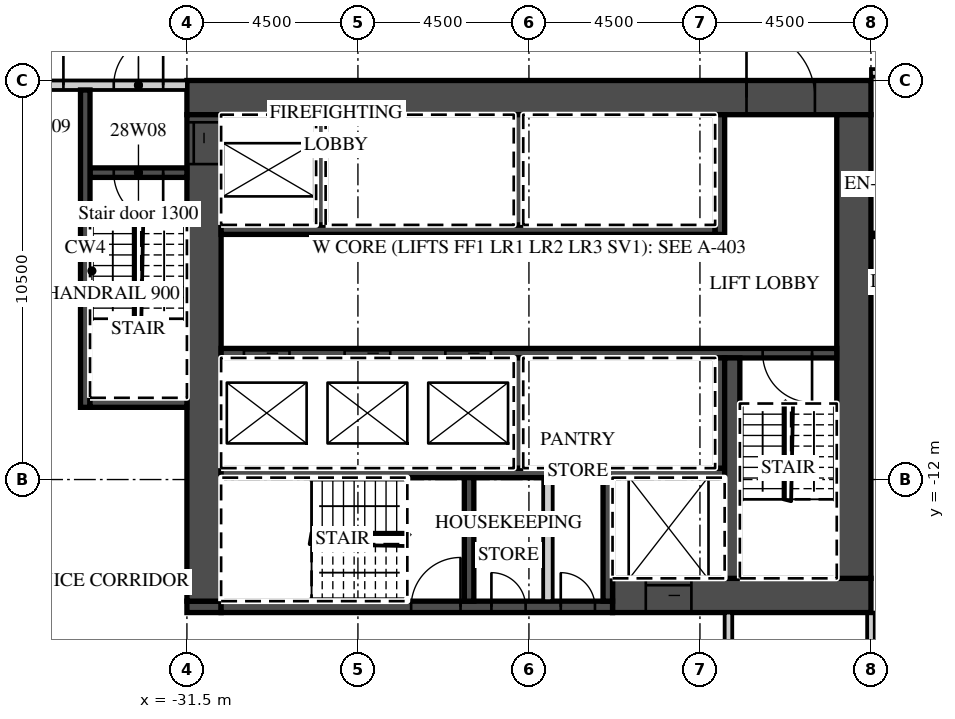
"""IFC4 building model, lengths in metres.
Left out: names, types, materials, properties, quantities, classifications, styles, units other than length and angle.
Written with IfcOpenShell. Run it as: python <this file> out.ifc"""

import sys

from ifc_helpers import new_model, si_unit, direction, frame, frame_2d, origin, place, context, subcontext, project, spatial, rectangle, extrude, element, fill, save


model = new_model("IFC4")
c1 = context("Model", 3, precision=1e-05, world=origin(), true_north=direction((0.0, 1.0)))
c2 = subcontext(c1, "Body", "Model", "MODEL_VIEW")
j1 = project(units=[si_unit("LENGTHUNIT", "METRE"), si_unit("PLANEANGLEUNIT", "RADIAN")], contexts=[c1])
p1 = place(None, origin())
s1 = spatial("IfcSite", under=j1, at=p1, CompositionType="ELEMENT")
p2 = place(p1, origin())
s2 = spatial("IfcBuilding", under=s1, at=p2, CompositionType="ELEMENT")
p3 = place(p2, frame((0.0, 0.0, 127.3)))
s3 = spatial("IfcBuildingStorey", under=s2, at=p3, CompositionType="ELEMENT", Elevation=127.3)
p4 = place(p3, frame((-13.5, -22.232, 0.0), z_axis=(0.0, 0.0, 1.0), x_axis=(0.0, 1.0, 0.0)))
e1 = element("IfcWall", 1, at=p4, inside=s3, PredefinedType="PARTITIONING", context=c2, shape_type="SweptSolid", body=[
    extrude(rectangle(XDim=6.732, YDim=0.2, at=frame_2d((3.366, 0.0))), origin(), (0.0, 0.0, 1.0), 3.02),
])
p5 = place(p3, frame((-13.5, -1.3, 0.0), z_axis=(0.0, 0.0, 1.0), x_axis=(1.0, 0.0, 0.0)))
e2 = element("IfcWall", 2, at=p5, inside=s3, PredefinedType="PARTITIONING", context=c2, shape_type="SweptSolid", body=[
    extrude(rectangle(XDim=60.932, YDim=0.2, at=frame_2d((30.466, 0.0))), origin(), (0.0, 0.0, 1.0), 3.02),
])
p6 = place(p5, frame((2.925, 0.0, 0.0)))
e3 = element("IfcOpeningElement", 3, at=p6, cuts=e2, PredefinedType="OPENING", context=c2, shape_type="SweptSolid", body=[
    extrude(rectangle(XDim=1.0, YDim=2.1, at=frame_2d((0.5, 1.05))), frame((0.0, 0.11, 0.0), z_axis=(0.0, -1.0, 0.0), x_axis=(1.0, 0.0, 0.0)), (0.0, 0.0, 1.0), 0.22),
])
p7 = place(p5, frame((9.863, 0.0, 0.0)))
e4 = element("IfcOpeningElement", 4, at=p7, cuts=e2, PredefinedType="OPENING", context=c2, shape_type="SweptSolid", body=[
    extrude(rectangle(XDim=1.2, YDim=2.1, at=frame_2d((0.6, 1.05))), frame((0.0, 0.11, 0.0), z_axis=(0.0, -1.0, 0.0), x_axis=(1.0, 0.0, 0.0)), (0.0, 0.0, 1.0), 0.22),
])
p8 = place(p5, frame((15.938, 0.0, 0.0)))
e5 = element("IfcOpeningElement", 5, at=p8, cuts=e2, PredefinedType="OPENING", context=c2, shape_type="SweptSolid", body=[
    extrude(rectangle(XDim=1.2, YDim=2.1, at=frame_2d((0.6, 1.05))), frame((0.0, 0.11, 0.0), z_axis=(0.0, -1.0, 0.0), x_axis=(1.0, 0.0, 0.0)), (0.0, 0.0, 1.0), 0.22),
])
p9 = place(p5, frame((27.862, 0.0, 0.0)))
e6 = element("IfcOpeningElement", 6, at=p9, cuts=e2, PredefinedType="OPENING", context=c2, shape_type="SweptSolid", body=[
    extrude(rectangle(XDim=1.2, YDim=2.1, at=frame_2d((0.6, 1.05))), frame((0.0, 0.11, 0.0), z_axis=(0.0, -1.0, 0.0), x_axis=(1.0, 0.0, 0.0)), (0.0, 0.0, 1.0), 0.22),
])
p10 = place(p5, frame((34.45, 0.0, 0.0)))
e7 = element("IfcOpeningElement", 7, at=p10, cuts=e2, PredefinedType="OPENING", context=c2, shape_type="SweptSolid", body=[
    extrude(rectangle(XDim=1.0, YDim=2.1, at=frame_2d((0.5, 1.05))), frame((0.0, 0.11, 0.0), z_axis=(0.0, -1.0, 0.0), x_axis=(1.0, 0.0, 0.0)), (0.0, 0.0, 1.0), 0.22),
])
p11 = place(p5, frame((36.55, 0.0, 0.0)))
e8 = element("IfcOpeningElement", 8, at=p11, cuts=e2, PredefinedType="OPENING", context=c2, shape_type="SweptSolid", body=[
    extrude(rectangle(XDim=1.0, YDim=2.1, at=frame_2d((0.5, 1.05))), frame((0.0, 0.11, 0.0), z_axis=(0.0, -1.0, 0.0), x_axis=(1.0, 0.0, 0.0)), (0.0, 0.0, 1.0), 0.22),
])
p12 = place(p5, frame((41.075, 0.0, 0.0)))
e9 = element("IfcOpeningElement", 9, at=p12, cuts=e2, PredefinedType="OPENING", context=c2, shape_type="SweptSolid", body=[
    extrude(rectangle(XDim=1.0, YDim=2.1, at=frame_2d((0.5, 1.05))), frame((0.0, 0.11, 0.0), z_axis=(0.0, -1.0, 0.0), x_axis=(1.0, 0.0, 0.0)), (0.0, 0.0, 1.0), 0.22),
])
p13 = place(p5, frame((45.55, 0.0, 0.0)))
e10 = element("IfcOpeningElement", 10, at=p13, cuts=e2, PredefinedType="OPENING", context=c2, shape_type="SweptSolid", body=[
    extrude(rectangle(XDim=1.0, YDim=2.1, at=frame_2d((0.5, 1.05))), frame((0.0, 0.11, 0.0), z_axis=(0.0, -1.0, 0.0), x_axis=(1.0, 0.0, 0.0)), (0.0, 0.0, 1.0), 0.22),
])
p14 = place(p5, frame((50.075, 0.0, 0.0)))
e11 = element("IfcOpeningElement", 11, at=p14, cuts=e2, PredefinedType="OPENING", context=c2, shape_type="SweptSolid", body=[
    extrude(rectangle(XDim=1.0, YDim=2.1, at=frame_2d((0.5, 1.05))), frame((0.0, 0.11, 0.0), z_axis=(0.0, -1.0, 0.0), x_axis=(1.0, 0.0, 0.0)), (0.0, 0.0, 1.0), 0.22),
])
p15 = place(p5, frame((54.575, 0.0, 0.0)))
e12 = element("IfcOpeningElement", 12, at=p15, cuts=e2, PredefinedType="OPENING", context=c2, shape_type="SweptSolid", body=[
    extrude(rectangle(XDim=1.0, YDim=2.1, at=frame_2d((0.5, 1.05))), frame((0.0, 0.11, 0.0), z_axis=(0.0, -1.0, 0.0), x_axis=(1.0, 0.0, 0.0)), (0.0, 0.0, 1.0), 0.22),
])
p16 = place(p5, frame((59.882, 0.0, 0.0)))
e13 = element("IfcOpeningElement", 13, at=p16, cuts=e2, PredefinedType="OPENING", context=c2, shape_type="SweptSolid", body=[
    extrude(rectangle(XDim=0.9, YDim=2.1, at=frame_2d((0.45, 1.05))), frame((0.0, 0.11, 0.0), z_axis=(0.0, -1.0, 0.0), x_axis=(1.0, 0.0, 0.0)), (0.0, 0.0, 1.0), 0.22),
])
p17 = place(p3, frame((-31.5, -1.95, 0.0), z_axis=(0.0, 0.0, 1.0), x_axis=(1.0, 0.0, 0.0)))
e14 = element("IfcWall", 14, at=p17, inside=s3, PredefinedType="SHEAR", context=c2, shape_type="SweptSolid", body=[
    extrude(rectangle(XDim=18.0, YDim=0.9, at=frame_2d((9.0, 0.0))), origin(), (0.0, 0.0, 1.0), 3.02),
])
p18 = place(p17, frame((14.725, 0.0, 0.0)))
e15 = element("IfcOpeningElement", 15, at=p18, cuts=e14, PredefinedType="OPENING", context=c2, shape_type="SweptSolid", body=[
    extrude(rectangle(XDim=1.8, YDim=2.1, at=frame_2d((0.9, 1.05))), frame((0.0, 0.46, 0.0), z_axis=(0.0, -1.0, 0.0), x_axis=(1.0, 0.0, 0.0)), (0.0, 0.0, 1.0), 0.92),
])
p19 = place(p3, frame((-20.3, -15.05, 0.0), z_axis=(0.0, 0.0, 1.0), x_axis=(1.0, 0.0, 0.0)))
e16 = element("IfcWall", 16, at=p19, inside=s3, PredefinedType="SHEAR", context=c2, shape_type="SweptSolid", body=[
    extrude(rectangle(XDim=6.8, YDim=0.9, at=frame_2d((3.4, 0.0))), origin(), (0.0, 0.0, 1.0), 3.02),
])
p20 = place(p19, frame((0.875, 0.0, 0.0)))
e17 = element("IfcOpeningElement", 17, at=p20, cuts=e16, PredefinedType="OPENING", context=c2, shape_type="SweptSolid", body=[
    extrude(rectangle(XDim=1.2, YDim=2.1, at=frame_2d((0.6, 1.05))), frame((0.0, 0.46, 0.0), z_axis=(0.0, -1.0, 0.0), x_axis=(1.0, 0.0, 0.0)), (0.0, 0.0, 1.0), 0.92),
])
p21 = place(p3, frame((-31.5, -15.35, 0.0), z_axis=(0.0, 0.0, 1.0), x_axis=(1.0, 0.0, 0.0)))
e18 = element("IfcWall", 18, at=p21, inside=s3, PredefinedType="SHEAR", context=c2, shape_type="SweptSolid", body=[
    extrude(rectangle(XDim=0.9, YDim=0.3, at=frame_2d((0.45, 0.0))), origin(), (0.0, 0.0, 1.0), 3.02),
])
p22 = place(p3, frame((-30.6, -15.35, 0.0), z_axis=(0.0, 0.0, 1.0), x_axis=(1.0, 0.0, 0.0)))
e19 = element("IfcWall", 19, at=p22, inside=s3, PredefinedType="SHEAR", context=c2, shape_type="SweptSolid", body=[
    extrude(rectangle(XDim=10.3, YDim=0.3, at=frame_2d((5.15, 0.0))), origin(), (0.0, 0.0, 1.0), 3.02),
])
p23 = place(p22, frame((5.0, 0.0, 0.0)))
e20 = element("IfcOpeningElement", 20, at=p23, cuts=e19, PredefinedType="OPENING", context=c2, shape_type="SweptSolid", body=[
    extrude(rectangle(XDim=1.3, YDim=2.1, at=frame_2d((0.65, 1.05))), frame((0.0, 0.16, 0.0), z_axis=(0.0, -1.0, 0.0), x_axis=(1.0, 0.0, 0.0)), (0.0, 0.0, 1.0), 0.32),
])
p24 = place(p22, frame((7.113, 0.0, 0.0)))
e21 = element("IfcOpeningElement", 21, at=p24, cuts=e19, PredefinedType="OPENING", context=c2, shape_type="SweptSolid", body=[
    extrude(rectangle(XDim=0.9, YDim=2.1, at=frame_2d((0.45, 1.05))), frame((0.0, 0.16, 0.0), z_axis=(0.0, -1.0, 0.0), x_axis=(1.0, 0.0, 0.0)), (0.0, 0.0, 1.0), 0.32),
])
p25 = place(p22, frame((8.938, 0.0, 0.0)))
e22 = element("IfcOpeningElement", 22, at=p25, cuts=e19, PredefinedType="OPENING", context=c2, shape_type="SweptSolid", body=[
    extrude(rectangle(XDim=0.9, YDim=2.1, at=frame_2d((0.45, 1.05))), frame((0.0, 0.16, 0.0), z_axis=(0.0, -1.0, 0.0), x_axis=(1.0, 0.0, 0.0)), (0.0, 0.0, 1.0), 0.32),
])
p26 = place(p3, frame((-31.05, -15.2, 0.0), z_axis=(0.0, 0.0, 1.0), x_axis=(0.0, 1.0, 0.0)))
e23 = element("IfcWall", 23, at=p26, inside=s3, PredefinedType="SHEAR", context=c2, shape_type="SweptSolid", body=[
    extrude(rectangle(XDim=12.8, YDim=0.9, at=frame_2d((6.4, 0.0))), origin(), (0.0, 0.0, 1.0), 3.02),
])
p27 = place(p26, frame((11.5, 0.0, 0.0)))
e24 = element("IfcOpeningElement", 24, at=p27, cuts=e23, PredefinedType="OPENING", context=c2, shape_type="SweptSolid", body=[
    extrude(rectangle(XDim=1.1, YDim=2.1, at=frame_2d((0.55, 1.05))), frame((0.0, 0.46, 0.0), z_axis=(0.0, -1.0, 0.0), x_axis=(1.0, 0.0, 0.0)), (0.0, 0.0, 1.0), 0.92),
])
p28 = place(p3, frame((-13.95, -14.6, 0.0), z_axis=(0.0, 0.0, 1.0), x_axis=(0.0, 1.0, 0.0)))
e25 = element("IfcWall", 25, at=p28, inside=s3, PredefinedType="SHEAR", context=c2, shape_type="SweptSolid", body=[
    extrude(rectangle(XDim=12.2, YDim=0.9, at=frame_2d((6.1, 0.0))), origin(), (0.0, 0.0, 1.0), 3.02),
])
p29 = place(p3, frame((-30.6, -5.425, 0.0), z_axis=(0.0, 0.0, 1.0), x_axis=(1.0, 0.0, 0.0)))
e26 = element("IfcWall", 26, at=p29, inside=s3, PredefinedType="SHEAR", context=c2, shape_type="SweptSolid", body=[
    extrude(rectangle(XDim=13.0, YDim=0.25, at=frame_2d((6.5, 0.0))), origin(), (0.0, 0.0, 1.0), 3.02),
])
p30 = place(p3, frame((-17.475, -5.55, 0.0), z_axis=(0.0, 0.0, 1.0), x_axis=(0.0, 1.0, 0.0)))
e27 = element("IfcWall", 27, at=p30, inside=s3, PredefinedType="SHEAR", context=c2, shape_type="SweptSolid", body=[
    extrude(rectangle(XDim=3.15, YDim=0.25, at=frame_2d((1.575, 0.0))), origin(), (0.0, 0.0, 1.0), 3.02),
])
for number, where, z_axis, x_axis in (
    (28, (-27.975, -5.3, 0.0), (0.0, 0.0, 1.0), (0.0, 1.0, 0.0)),
    (29, (-22.775, -5.3, 0.0), (0.0, 0.0, 1.0), (0.0, 1.0, 0.0)),
):
    element("IfcWall", number, at=place(p3, frame(where, z_axis=z_axis, x_axis=x_axis)), inside=s3, PredefinedType="SHEAR", context=c2, shape_type="SweptSolid", body=[
        extrude(rectangle(XDim=2.9, YDim=0.25, at=frame_2d((1.45, 0.0))), origin(), (0.0, 0.0, 1.0), 3.02),
    ])
p31 = place(p3, frame((-30.6, -8.675, 0.0), z_axis=(0.0, 0.0, 1.0), x_axis=(1.0, 0.0, 0.0)))
e30 = element("IfcWall", 30, at=p31, inside=s3, PredefinedType="SHEAR", context=c2, shape_type="SweptSolid", body=[
    extrude(rectangle(XDim=16.2, YDim=0.25, at=frame_2d((8.1, 0.0))), origin(), (0.0, 0.0, 1.0), 3.02),
])
p32 = place(p31, frame((0.6, 0.0, 0.0)))
e31 = element("IfcOpeningElement", 31, at=p32, cuts=e30, PredefinedType="OPENING", context=c2, shape_type="SweptSolid", body=[
    extrude(rectangle(XDim=1.2, YDim=2.1, at=frame_2d((0.6, 1.05))), frame((0.0, 0.135, 0.0), z_axis=(0.0, -1.0, 0.0), x_axis=(1.0, 0.0, 0.0)), (0.0, 0.0, 1.0), 0.27),
])
p33 = place(p31, frame((3.25, 0.0, 0.0)))
e32 = element("IfcOpeningElement", 32, at=p33, cuts=e30, PredefinedType="OPENING", context=c2, shape_type="SweptSolid", body=[
    extrude(rectangle(XDim=1.2, YDim=2.1, at=frame_2d((0.6, 1.05))), frame((0.0, 0.135, 0.0), z_axis=(0.0, -1.0, 0.0), x_axis=(1.0, 0.0, 0.0)), (0.0, 0.0, 1.0), 0.27),
])
p34 = place(p31, frame((5.9, 0.0, 0.0)))
e33 = element("IfcOpeningElement", 33, at=p34, cuts=e30, PredefinedType="OPENING", context=c2, shape_type="SweptSolid", body=[
    extrude(rectangle(XDim=1.2, YDim=2.1, at=frame_2d((0.6, 1.05))), frame((0.0, 0.135, 0.0), z_axis=(0.0, -1.0, 0.0), x_axis=(1.0, 0.0, 0.0)), (0.0, 0.0, 1.0), 0.27),
])
p35 = place(p31, frame((14.25, 0.0, 0.0)))
e34 = element("IfcOpeningElement", 34, at=p35, cuts=e30, PredefinedType="OPENING", context=c2, shape_type="SweptSolid", body=[
    extrude(rectangle(XDim=1.3, YDim=2.1, at=frame_2d((0.65, 1.05))), frame((0.0, 0.135, 0.0), z_axis=(0.0, -1.0, 0.0), x_axis=(1.0, 0.0, 0.0)), (0.0, 0.0, 1.0), 0.27),
])
p36 = place(p3, frame((-30.6, -11.825, 0.0), z_axis=(0.0, 0.0, 1.0), x_axis=(1.0, 0.0, 0.0)))
e35 = element("IfcWall", 35, at=p36, inside=s3, PredefinedType="SHEAR", context=c2, shape_type="SweptSolid", body=[
    extrude(rectangle(XDim=13.25, YDim=0.25, at=frame_2d((6.625, 0.0))), origin(), (0.0, 0.0, 1.0), 3.02),
])
for number, where, z_axis, x_axis in (
    (36, (-17.475, -11.7, 0.0), (0.0, 0.0, 1.0), (0.0, 1.0, 0.0)),
    (37, (-22.775, -11.7, 0.0), (0.0, 0.0, 1.0), (0.0, 1.0, 0.0)),
):
    element("IfcWall", number, at=place(p3, frame(where, z_axis=z_axis, x_axis=x_axis)), inside=s3, PredefinedType="SHEAR", context=c2, shape_type="SweptSolid", body=[
        extrude(rectangle(XDim=2.9, YDim=0.25, at=frame_2d((1.45, 0.0))), origin(), (0.0, 0.0, 1.0), 3.02),
    ])
p37 = place(p3, frame((-17.15, -14.6, 0.0), z_axis=(0.0, 0.0, 1.0), x_axis=(0.0, 1.0, 0.0)))
e38 = element("IfcWall", 38, at=p37, inside=s3, PredefinedType="SHEAR", context=c2, shape_type="SweptSolid", body=[
    extrude(rectangle(XDim=5.8, YDim=0.4, at=frame_2d((2.9, 0.0))), origin(), (0.0, 0.0, 1.0), 3.02),
])
for number, where, z_axis, x_axis in (
    (39, (-20.425, -15.2, 0.0), (0.0, 0.0, 1.0), (0.0, 1.0, 0.0)),
    (40, (-24.075, -15.2, 0.0), (0.0, 0.0, 1.0), (0.0, 1.0, 0.0)),
):
    element("IfcWall", number, at=place(p3, frame(where, z_axis=z_axis, x_axis=x_axis)), inside=s3, PredefinedType="SHEAR", context=c2, shape_type="SweptSolid", body=[
        extrude(rectangle(XDim=3.25, YDim=0.25, at=frame_2d((1.625, 0.0))), origin(), (0.0, 0.0, 1.0), 3.02),
    ])
p38 = place(p3, frame((-22.0, -15.2, 0.0), z_axis=(0.0, 0.0, 1.0), x_axis=(0.0, 1.0, 0.0)))
e41 = element("IfcWall", 41, at=p38, inside=s3, PredefinedType="PARTITIONING", context=c2, shape_type="SweptSolid", body=[
    extrude(rectangle(XDim=3.25, YDim=0.25, at=frame_2d((1.625, 0.0))), origin(), (0.0, 0.0, 1.0), 3.02),
])
p39 = place(p3, frame((-39.035, -1.625, 0.0), z_axis=(0.0, 0.0, 1.0), x_axis=(1.0, 0.0, 0.0)))
e42 = element("IfcWall", 42, at=p39, inside=s3, PredefinedType="PARTITIONING", context=c2, shape_type="SweptSolid", body=[
    extrude(rectangle(XDim=7.535, YDim=0.25, at=frame_2d((3.768, 0.0))), origin(), (0.0, 0.0, 1.0), 3.02),
])
p40 = place(p39, frame((5.61, 0.0, 0.0)))
e43 = element("IfcOpeningElement", 43, at=p40, cuts=e42, PredefinedType="OPENING", context=c2, shape_type="SweptSolid", body=[
    extrude(rectangle(XDim=1.3, YDim=2.1, at=frame_2d((0.65, 1.05))), frame((0.0, 0.135, 0.0), z_axis=(0.0, -1.0, 0.0), x_axis=(1.0, 0.0, 0.0)), (0.0, 0.0, 1.0), 0.27),
])
p41 = place(p39, frame((3.185, 0.0, 0.0)))
e44 = element("IfcOpeningElement", 44, at=p41, cuts=e42, PredefinedType="OPENING", context=c2, shape_type="SweptSolid", body=[
    extrude(rectangle(XDim=1.1, YDim=2.1, at=frame_2d((0.55, 1.05))), frame((0.0, 0.135, 0.0), z_axis=(0.0, -1.0, 0.0), x_axis=(1.0, 0.0, 0.0)), (0.0, 0.0, 1.0), 0.27),
])
p42 = place(p3, frame((-34.05, -3.925, 0.0), z_axis=(0.0, 0.0, 1.0), x_axis=(1.0, 0.0, 0.0)))
e45 = element("IfcWall", 45, at=p42, inside=s3, PredefinedType="SHEAR", context=c2, shape_type="SweptSolid", body=[
    extrude(rectangle(XDim=2.55, YDim=0.25, at=frame_2d((1.275, 0.0))), origin(), (0.0, 0.0, 1.0), 3.02),
])
p43 = place(p42, frame((0.625, 0.0, 0.0)))
e46 = element("IfcOpeningElement", 46, at=p43, cuts=e45, PredefinedType="OPENING", context=c2, shape_type="SweptSolid", body=[
    extrude(rectangle(XDim=1.3, YDim=2.1, at=frame_2d((0.65, 1.05))), frame((0.0, 0.135, 0.0), z_axis=(0.0, -1.0, 0.0), x_axis=(1.0, 0.0, 0.0)), (0.0, 0.0, 1.0), 0.27),
])
p44 = place(p3, frame((-34.175, -10.1, 0.0), z_axis=(0.0, 0.0, 1.0), x_axis=(0.0, 1.0, 0.0)))
e47 = element("IfcWall", 47, at=p44, inside=s3, PredefinedType="SHEAR", context=c2, shape_type="SweptSolid", body=[
    extrude(rectangle(XDim=8.35, YDim=0.25, at=frame_2d((4.175, 0.0))), origin(), (0.0, 0.0, 1.0), 3.02),
])
p45 = place(p3, frame((-34.05, -9.975, 0.0), z_axis=(0.0, 0.0, 1.0), x_axis=(1.0, 0.0, 0.0)))
e48 = element("IfcWall", 48, at=p45, inside=s3, PredefinedType="SHEAR", context=c2, shape_type="SweptSolid", body=[
    extrude(rectangle(XDim=2.55, YDim=0.25, at=frame_2d((1.275, 0.0))), origin(), (0.0, 0.0, 1.0), 3.02),
])
p46 = place(p3, frame((-17.25, -17.7, 0.0), z_axis=(0.0, 0.0, 1.0), x_axis=(0.0, 1.0, 0.0)))
e49 = element("IfcWall", 49, at=p46, inside=s3, PredefinedType="PARTITIONING", context=c2, shape_type="SweptSolid", body=[
    extrude(rectangle(XDim=2.2, YDim=0.2, at=frame_2d((1.1, 0.0))), origin(), (0.0, 0.0, 1.0), 3.02),
])
p47 = place(p32, origin())
e50 = element("IfcDoor", 50, at=p47, inside=s3, OperationType="SLIDING_TO_LEFT", PredefinedType="DOOR", context=c2, shape_type="SweptSolid", body=[
    extrude(rectangle(XDim=1.2, YDim=2.1, at=frame_2d((0.6, 1.05))), frame((0.0, 0.025, 0.0), z_axis=(0.0, -1.0, 0.0), x_axis=(1.0, 0.0, 0.0)), (0.0, 0.0, 1.0), 0.05),
])
fill(e31, e50)
p48 = place(p33, origin())
e51 = element("IfcDoor", 51, at=p48, inside=s3, OperationType="SLIDING_TO_RIGHT", PredefinedType="DOOR", context=c2, shape_type="SweptSolid", body=[
    extrude(rectangle(XDim=1.2, YDim=2.1, at=frame_2d((0.6, 1.05))), frame((0.0, 0.025, 0.0), z_axis=(0.0, -1.0, 0.0), x_axis=(1.0, 0.0, 0.0)), (0.0, 0.0, 1.0), 0.05),
])
fill(e32, e51)
p49 = place(p34, origin())
e52 = element("IfcDoor", 52, at=p49, inside=s3, OperationType="SLIDING_TO_RIGHT", PredefinedType="DOOR", context=c2, shape_type="SweptSolid", body=[
    extrude(rectangle(XDim=1.2, YDim=2.1, at=frame_2d((0.6, 1.05))), frame((0.0, 0.025, 0.0), z_axis=(0.0, -1.0, 0.0), x_axis=(1.0, 0.0, 0.0)), (0.0, 0.0, 1.0), 0.05),
])
fill(e33, e52)
p50 = place(p20, origin())
e53 = element("IfcDoor", 53, at=p50, inside=s3, OperationType="SLIDING_TO_LEFT", PredefinedType="DOOR", context=c2, shape_type="SweptSolid", body=[
    extrude(rectangle(XDim=1.2, YDim=2.1, at=frame_2d((0.6, 1.05))), frame((0.0, 0.025, 0.0), z_axis=(0.0, -1.0, 0.0), x_axis=(1.0, 0.0, 0.0)), (0.0, 0.0, 1.0), 0.05),
])
fill(e17, e53)
p51 = place(p27, origin())
e54 = element("IfcDoor", 54, at=p51, inside=s3, OperationType="SLIDING_TO_RIGHT", PredefinedType="DOOR", context=c2, shape_type="SweptSolid", body=[
    extrude(rectangle(XDim=1.1, YDim=2.1, at=frame_2d((0.55, 1.05))), frame((0.0, 0.025, 0.0), z_axis=(0.0, -1.0, 0.0), x_axis=(1.0, 0.0, 0.0)), (0.0, 0.0, 1.0), 0.05),
])
fill(e24, e54)
p52 = place(p18, origin())
e55 = element("IfcDoor", 55, at=p52, inside=s3, OperationType="DOUBLE_DOOR_DOUBLE_SWING", PredefinedType="DOOR", context=c2, shape_type="SweptSolid", body=[
    extrude(rectangle(XDim=1.8, YDim=2.1, at=frame_2d((0.9, 1.05))), frame((0.0, 0.025, 0.0), z_axis=(0.0, -1.0, 0.0), x_axis=(1.0, 0.0, 0.0)), (0.0, 0.0, 1.0), 0.05),
])
fill(e15, e55)
p53 = place(p40, origin())
e56 = element("IfcDoor", 56, at=p53, inside=s3, OperationType="SINGLE_SWING_RIGHT", PredefinedType="DOOR", context=c2, shape_type="SweptSolid", body=[
    extrude(rectangle(XDim=1.3, YDim=2.1, at=frame_2d((0.65, 1.05))), frame((0.0, 0.025, 0.0), z_axis=(0.0, -1.0, 0.0), x_axis=(1.0, 0.0, 0.0)), (0.0, 0.0, 1.0), 0.05),
])
fill(e43, e56)
p54 = place(p43, origin())
e57 = element("IfcDoor", 57, at=p54, inside=s3, OperationType="SINGLE_SWING_RIGHT", PredefinedType="DOOR", context=c2, shape_type="SweptSolid", body=[
    extrude(rectangle(XDim=1.3, YDim=2.1, at=frame_2d((0.65, 1.05))), frame((0.0, 0.025, 0.0), z_axis=(0.0, -1.0, 0.0), x_axis=(1.0, 0.0, 0.0)), (0.0, 0.0, 1.0), 0.05),
])
fill(e46, e57)
p55 = place(p41, origin())
e58 = element("IfcDoor", 58, at=p55, inside=s3, OperationType="SINGLE_SWING_RIGHT", PredefinedType="DOOR", context=c2, shape_type="SweptSolid", body=[
    extrude(rectangle(XDim=1.1, YDim=2.1, at=frame_2d((0.55, 1.05))), frame((0.0, 0.025, 0.0), z_axis=(0.0, -1.0, 0.0), x_axis=(1.0, 0.0, 0.0)), (0.0, 0.0, 1.0), 0.05),
])
fill(e44, e58)
p56 = place(p35, origin())
e59 = element("IfcDoor", 59, at=p56, inside=s3, OperationType="SINGLE_SWING_RIGHT", PredefinedType="DOOR", context=c2, shape_type="SweptSolid", body=[
    extrude(rectangle(XDim=1.3, YDim=2.1, at=frame_2d((0.65, 1.05))), frame((0.0, 0.025, 0.0), z_axis=(0.0, -1.0, 0.0), x_axis=(1.0, 0.0, 0.0)), (0.0, 0.0, 1.0), 0.05),
])
fill(e34, e59)
p57 = place(p23, origin())
e60 = element("IfcDoor", 60, at=p57, inside=s3, OperationType="SINGLE_SWING_RIGHT", PredefinedType="DOOR", context=c2, shape_type="SweptSolid", body=[
    extrude(rectangle(XDim=1.3, YDim=2.1, at=frame_2d((0.65, 1.05))), frame((0.0, 0.025, 0.0), z_axis=(0.0, -1.0, 0.0), x_axis=(1.0, 0.0, 0.0)), (0.0, 0.0, 1.0), 0.05),
])
fill(e20, e60)
p58 = place(p24, origin())
e61 = element("IfcDoor", 61, at=p58, inside=s3, OperationType="SINGLE_SWING_LEFT", PredefinedType="DOOR", context=c2, shape_type="SweptSolid", body=[
    extrude(rectangle(XDim=0.9, YDim=2.1, at=frame_2d((0.45, 1.05))), frame((0.0, 0.025, 0.0), z_axis=(0.0, -1.0, 0.0), x_axis=(1.0, 0.0, 0.0)), (0.0, 0.0, 1.0), 0.05),
])
fill(e21, e61)
p59 = place(p25, origin())
e62 = element("IfcDoor", 62, at=p59, inside=s3, OperationType="SINGLE_SWING_LEFT", PredefinedType="DOOR", context=c2, shape_type="SweptSolid", body=[
    extrude(rectangle(XDim=0.9, YDim=2.1, at=frame_2d((0.45, 1.05))), frame((0.0, 0.025, 0.0), z_axis=(0.0, -1.0, 0.0), x_axis=(1.0, 0.0, 0.0)), (0.0, 0.0, 1.0), 0.05),
])
fill(e22, e62)
save(model, sys.argv[1])
